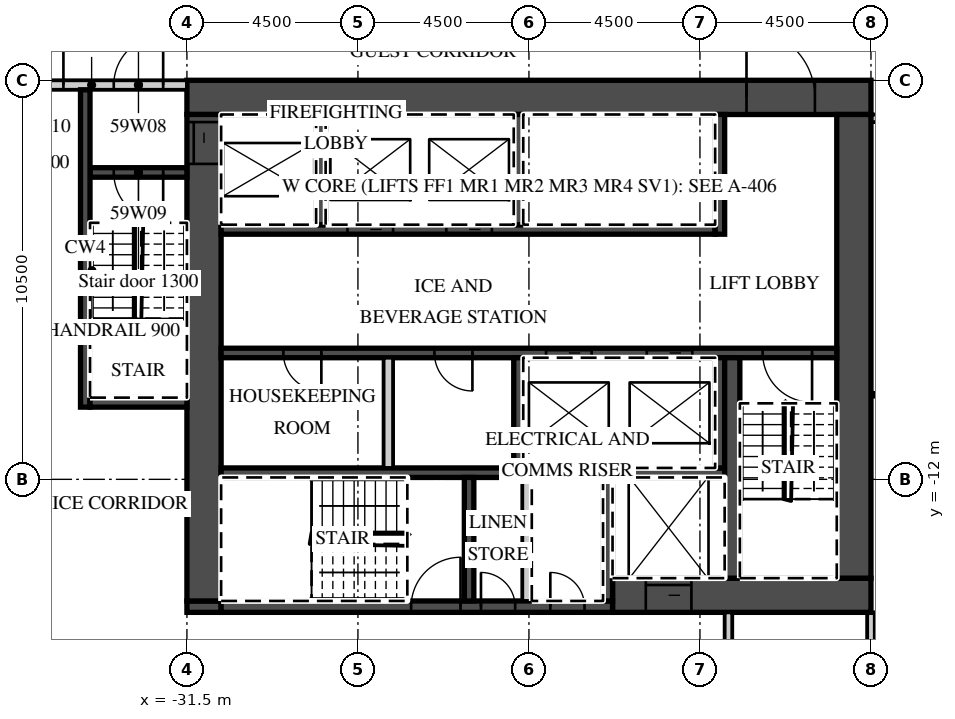
"""IFC4 building model, lengths in metres.
Left out: names, types, materials, properties, quantities, classifications, styles, units other than length and angle.
Written with IfcOpenShell. Run it as: python <this file> out.ifc"""

import sys

from ifc_helpers import new_model, si_unit, direction, frame, frame_2d, origin, place, context, subcontext, project, spatial, rectangle, extrude, element, fill, save


model = new_model("IFC4")
c1 = context("Model", 3, precision=1e-05, world=origin(), true_north=direction((0.0, 1.0)))
c2 = subcontext(c1, "Body", "Model", "MODEL_VIEW")
j1 = project(units=[si_unit("LENGTHUNIT", "METRE"), si_unit("PLANEANGLEUNIT", "RADIAN")], contexts=[c1])
p1 = place(None, origin())
s1 = spatial("IfcSite", under=j1, at=p1, CompositionType="ELEMENT")
p2 = place(p1, origin())
s2 = spatial("IfcBuilding", under=s1, at=p2, CompositionType="ELEMENT")
p3 = place(p2, frame((0.0, 0.0, 240.8)))
s3 = spatial("IfcBuildingStorey", under=s2, at=p3, CompositionType="ELEMENT", Elevation=240.8)
p4 = place(p3, frame((-13.5, -19.641, 0.0), z_axis=(0.0, 0.0, 1.0), x_axis=(0.0, 1.0, 0.0)))
e1 = element("IfcWall", 1, at=p4, inside=s3, PredefinedType="PARTITIONING", context=c2, shape_type="SweptSolid", body=[
    extrude(rectangle(XDim=4.141, YDim=0.2, at=frame_2d((2.071, 0.0))), origin(), (0.0, 0.0, 1.0), 3.02),
])
p5 = place(p3, frame((-13.5, -2.5, 0.0), z_axis=(0.0, 0.0, 1.0), x_axis=(1.0, 0.0, 0.0)))
e2 = element("IfcWall", 2, at=p5, inside=s3, PredefinedType="PARTITIONING", context=c2, shape_type="SweptSolid", body=[
    extrude(rectangle(XDim=27.0, YDim=0.2, at=frame_2d((13.5, 0.0))), origin(), (0.0, 0.0, 1.0), 3.02),
])
p6 = place(p5, frame((0.575, 0.0, 0.0)))
e3 = element("IfcOpeningElement", 3, at=p6, cuts=e2, PredefinedType="OPENING", context=c2, shape_type="SweptSolid", body=[
    extrude(rectangle(XDim=1.0, YDim=2.1, at=frame_2d((0.5, 1.05))), frame((0.0, 0.11, 0.0), z_axis=(0.0, -1.0, 0.0), x_axis=(1.0, 0.0, 0.0)), (0.0, 0.0, 1.0), 0.22),
])
p7 = place(p5, frame((9.863, 0.0, 0.0)))
e4 = element("IfcOpeningElement", 4, at=p7, cuts=e2, PredefinedType="OPENING", context=c2, shape_type="SweptSolid", body=[
    extrude(rectangle(XDim=1.2, YDim=2.1, at=frame_2d((0.6, 1.05))), frame((0.0, 0.11, 0.0), z_axis=(0.0, -1.0, 0.0), x_axis=(1.0, 0.0, 0.0)), (0.0, 0.0, 1.0), 0.22),
])
p8 = place(p5, frame((15.938, 0.0, 0.0)))
e5 = element("IfcOpeningElement", 5, at=p8, cuts=e2, PredefinedType="OPENING", context=c2, shape_type="SweptSolid", body=[
    extrude(rectangle(XDim=1.2, YDim=2.1, at=frame_2d((0.6, 1.05))), frame((0.0, 0.11, 0.0), z_axis=(0.0, -1.0, 0.0), x_axis=(1.0, 0.0, 0.0)), (0.0, 0.0, 1.0), 0.22),
])
p9 = place(p5, frame((23.075, 0.0, 0.0)))
e6 = element("IfcOpeningElement", 6, at=p9, cuts=e2, PredefinedType="OPENING", context=c2, shape_type="SweptSolid", body=[
    extrude(rectangle(XDim=1.0, YDim=2.1, at=frame_2d((0.5, 1.05))), frame((0.0, 0.11, 0.0), z_axis=(0.0, -1.0, 0.0), x_axis=(1.0, 0.0, 0.0)), (0.0, 0.0, 1.0), 0.22),
])
p10 = place(p3, frame((-31.5, -1.95, 0.0), z_axis=(0.0, 0.0, 1.0), x_axis=(1.0, 0.0, 0.0)))
e7 = element("IfcWall", 7, at=p10, inside=s3, PredefinedType="SHEAR", context=c2, shape_type="SweptSolid", body=[
    extrude(rectangle(XDim=18.0, YDim=0.9, at=frame_2d((9.0, 0.0))), origin(), (0.0, 0.0, 1.0), 3.02),
])
p11 = place(p10, frame((14.725, 0.0, 0.0)))
e8 = element("IfcOpeningElement", 8, at=p11, cuts=e7, PredefinedType="OPENING", context=c2, shape_type="SweptSolid", body=[
    extrude(rectangle(XDim=1.8, YDim=2.1, at=frame_2d((0.9, 1.05))), frame((0.0, 0.46, 0.0), z_axis=(0.0, -1.0, 0.0), x_axis=(1.0, 0.0, 0.0)), (0.0, 0.0, 1.0), 0.92),
])
p12 = place(p3, frame((-20.3, -15.05, 0.0), z_axis=(0.0, 0.0, 1.0), x_axis=(1.0, 0.0, 0.0)))
e9 = element("IfcWall", 9, at=p12, inside=s3, PredefinedType="SHEAR", context=c2, shape_type="SweptSolid", body=[
    extrude(rectangle(XDim=6.8, YDim=0.9, at=frame_2d((3.4, 0.0))), origin(), (0.0, 0.0, 1.0), 3.02),
])
p13 = place(p12, frame((0.875, 0.0, 0.0)))
e10 = element("IfcOpeningElement", 10, at=p13, cuts=e9, PredefinedType="OPENING", context=c2, shape_type="SweptSolid", body=[
    extrude(rectangle(XDim=1.2, YDim=2.1, at=frame_2d((0.6, 1.05))), frame((0.0, 0.46, 0.0), z_axis=(0.0, -1.0, 0.0), x_axis=(1.0, 0.0, 0.0)), (0.0, 0.0, 1.0), 0.92),
])
p14 = place(p3, frame((-31.5, -15.35, 0.0), z_axis=(0.0, 0.0, 1.0), x_axis=(1.0, 0.0, 0.0)))
e11 = element("IfcWall", 11, at=p14, inside=s3, PredefinedType="SHEAR", context=c2, shape_type="SweptSolid", body=[
    extrude(rectangle(XDim=0.9, YDim=0.3, at=frame_2d((0.45, 0.0))), origin(), (0.0, 0.0, 1.0), 3.02),
])
p15 = place(p3, frame((-30.6, -15.35, 0.0), z_axis=(0.0, 0.0, 1.0), x_axis=(1.0, 0.0, 0.0)))
e12 = element("IfcWall", 12, at=p15, inside=s3, PredefinedType="SHEAR", context=c2, shape_type="SweptSolid", body=[
    extrude(rectangle(XDim=10.3, YDim=0.3, at=frame_2d((5.15, 0.0))), origin(), (0.0, 0.0, 1.0), 3.02),
])
p16 = place(p15, frame((5.0, 0.0, 0.0)))
e13 = element("IfcOpeningElement", 13, at=p16, cuts=e12, PredefinedType="OPENING", context=c2, shape_type="SweptSolid", body=[
    extrude(rectangle(XDim=1.3, YDim=2.1, at=frame_2d((0.65, 1.05))), frame((0.0, 0.16, 0.0), z_axis=(0.0, -1.0, 0.0), x_axis=(1.0, 0.0, 0.0)), (0.0, 0.0, 1.0), 0.32),
])
p17 = place(p15, frame((6.837, 0.0, 0.0)))
e14 = element("IfcOpeningElement", 14, at=p17, cuts=e12, PredefinedType="OPENING", context=c2, shape_type="SweptSolid", body=[
    extrude(rectangle(XDim=0.9, YDim=2.1, at=frame_2d((0.45, 1.05))), frame((0.0, 0.16, 0.0), z_axis=(0.0, -1.0, 0.0), x_axis=(1.0, 0.0, 0.0)), (0.0, 0.0, 1.0), 0.32),
])
p18 = place(p15, frame((8.663, 0.0, 0.0)))
e15 = element("IfcOpeningElement", 15, at=p18, cuts=e12, PredefinedType="OPENING", context=c2, shape_type="SweptSolid", body=[
    extrude(rectangle(XDim=0.9, YDim=2.1, at=frame_2d((0.45, 1.05))), frame((0.0, 0.16, 0.0), z_axis=(0.0, -1.0, 0.0), x_axis=(1.0, 0.0, 0.0)), (0.0, 0.0, 1.0), 0.32),
])
p19 = place(p3, frame((-31.05, -15.2, 0.0), z_axis=(0.0, 0.0, 1.0), x_axis=(0.0, 1.0, 0.0)))
e16 = element("IfcWall", 16, at=p19, inside=s3, PredefinedType="SHEAR", context=c2, shape_type="SweptSolid", body=[
    extrude(rectangle(XDim=12.8, YDim=0.9, at=frame_2d((6.4, 0.0))), origin(), (0.0, 0.0, 1.0), 3.02),
])
p20 = place(p19, frame((11.5, 0.0, 0.0)))
e17 = element("IfcOpeningElement", 17, at=p20, cuts=e16, PredefinedType="OPENING", context=c2, shape_type="SweptSolid", body=[
    extrude(rectangle(XDim=1.1, YDim=2.1, at=frame_2d((0.55, 1.05))), frame((0.0, 0.46, 0.0), z_axis=(0.0, -1.0, 0.0), x_axis=(1.0, 0.0, 0.0)), (0.0, 0.0, 1.0), 0.92),
])
p21 = place(p3, frame((-13.95, -14.6, 0.0), z_axis=(0.0, 0.0, 1.0), x_axis=(0.0, 1.0, 0.0)))
e18 = element("IfcWall", 18, at=p21, inside=s3, PredefinedType="SHEAR", context=c2, shape_type="SweptSolid", body=[
    extrude(rectangle(XDim=12.2, YDim=0.9, at=frame_2d((6.1, 0.0))), origin(), (0.0, 0.0, 1.0), 3.02),
])
p22 = place(p3, frame((-30.6, -5.425, 0.0), z_axis=(0.0, 0.0, 1.0), x_axis=(1.0, 0.0, 0.0)))
e19 = element("IfcWall", 19, at=p22, inside=s3, PredefinedType="SHEAR", context=c2, shape_type="SweptSolid", body=[
    extrude(rectangle(XDim=13.0, YDim=0.25, at=frame_2d((6.5, 0.0))), origin(), (0.0, 0.0, 1.0), 3.02),
])
p23 = place(p22, frame((3.325, 0.0, 0.0)))
e20 = element("IfcOpeningElement", 20, at=p23, cuts=e19, PredefinedType="OPENING", context=c2, shape_type="SweptSolid", body=[
    extrude(rectangle(XDim=1.2, YDim=2.1, at=frame_2d((0.6, 1.05))), frame((0.0, 0.135, 0.0), z_axis=(0.0, -1.0, 0.0), x_axis=(1.0, 0.0, 0.0)), (0.0, 0.0, 1.0), 0.27),
])
p24 = place(p22, frame((5.925, 0.0, 0.0)))
e21 = element("IfcOpeningElement", 21, at=p24, cuts=e19, PredefinedType="OPENING", context=c2, shape_type="SweptSolid", body=[
    extrude(rectangle(XDim=1.2, YDim=2.1, at=frame_2d((0.6, 1.05))), frame((0.0, 0.135, 0.0), z_axis=(0.0, -1.0, 0.0), x_axis=(1.0, 0.0, 0.0)), (0.0, 0.0, 1.0), 0.27),
])
p25 = place(p3, frame((-17.475, -5.55, 0.0), z_axis=(0.0, 0.0, 1.0), x_axis=(0.0, 1.0, 0.0)))
e22 = element("IfcWall", 22, at=p25, inside=s3, PredefinedType="SHEAR", context=c2, shape_type="SweptSolid", body=[
    extrude(rectangle(XDim=3.15, YDim=0.25, at=frame_2d((1.575, 0.0))), origin(), (0.0, 0.0, 1.0), 3.02),
])
for number, where, z_axis, x_axis in (
    (23, (-27.975, -5.3, 0.0), (0.0, 0.0, 1.0), (0.0, 1.0, 0.0)),
    (24, (-22.775, -5.3, 0.0), (0.0, 0.0, 1.0), (0.0, 1.0, 0.0)),
):
    element("IfcWall", number, at=place(p3, frame(where, z_axis=z_axis, x_axis=x_axis)), inside=s3, PredefinedType="SHEAR", context=c2, shape_type="SweptSolid", body=[
        extrude(rectangle(XDim=2.9, YDim=0.25, at=frame_2d((1.45, 0.0))), origin(), (0.0, 0.0, 1.0), 3.02),
    ])
p26 = place(p3, frame((-30.6, -8.675, 0.0), z_axis=(0.0, 0.0, 1.0), x_axis=(1.0, 0.0, 0.0)))
e25 = element("IfcWall", 25, at=p26, inside=s3, PredefinedType="SHEAR", context=c2, shape_type="SweptSolid", body=[
    extrude(rectangle(XDim=16.2, YDim=0.25, at=frame_2d((8.1, 0.0))), origin(), (0.0, 0.0, 1.0), 3.02),
])
p27 = place(p26, frame((8.55, 0.0, 0.0)))
e26 = element("IfcOpeningElement", 26, at=p27, cuts=e25, PredefinedType="OPENING", context=c2, shape_type="SweptSolid", body=[
    extrude(rectangle(XDim=1.2, YDim=2.1, at=frame_2d((0.6, 1.05))), frame((0.0, 0.135, 0.0), z_axis=(0.0, -1.0, 0.0), x_axis=(1.0, 0.0, 0.0)), (0.0, 0.0, 1.0), 0.27),
])
p28 = place(p26, frame((11.2, 0.0, 0.0)))
e27 = element("IfcOpeningElement", 27, at=p28, cuts=e25, PredefinedType="OPENING", context=c2, shape_type="SweptSolid", body=[
    extrude(rectangle(XDim=1.2, YDim=2.1, at=frame_2d((0.6, 1.05))), frame((0.0, 0.135, 0.0), z_axis=(0.0, -1.0, 0.0), x_axis=(1.0, 0.0, 0.0)), (0.0, 0.0, 1.0), 0.27),
])
p29 = place(p26, frame((14.25, 0.0, 0.0)))
e28 = element("IfcOpeningElement", 28, at=p29, cuts=e25, PredefinedType="OPENING", context=c2, shape_type="SweptSolid", body=[
    extrude(rectangle(XDim=1.3, YDim=2.1, at=frame_2d((0.65, 1.05))), frame((0.0, 0.135, 0.0), z_axis=(0.0, -1.0, 0.0), x_axis=(1.0, 0.0, 0.0)), (0.0, 0.0, 1.0), 0.27),
])
p30 = place(p26, frame((1.637, 0.0, 0.0)))
e29 = element("IfcOpeningElement", 29, at=p30, cuts=e25, PredefinedType="OPENING", context=c2, shape_type="SweptSolid", body=[
    extrude(rectangle(XDim=1.0, YDim=2.1, at=frame_2d((0.5, 1.05))), frame((0.0, 0.135, 0.0), z_axis=(0.0, -1.0, 0.0), x_axis=(1.0, 0.0, 0.0)), (0.0, 0.0, 1.0), 0.27),
])
p31 = place(p26, frame((5.613, 0.0, 0.0)))
e30 = element("IfcOpeningElement", 30, at=p31, cuts=e25, PredefinedType="OPENING", context=c2, shape_type="SweptSolid", body=[
    extrude(rectangle(XDim=1.0, YDim=2.1, at=frame_2d((0.5, 1.05))), frame((0.0, 0.135, 0.0), z_axis=(0.0, -1.0, 0.0), x_axis=(1.0, 0.0, 0.0)), (0.0, 0.0, 1.0), 0.27),
])
p32 = place(p3, frame((-30.6, -11.825, 0.0), z_axis=(0.0, 0.0, 1.0), x_axis=(1.0, 0.0, 0.0)))
e31 = element("IfcWall", 31, at=p32, inside=s3, PredefinedType="SHEAR", context=c2, shape_type="SweptSolid", body=[
    extrude(rectangle(XDim=13.25, YDim=0.25, at=frame_2d((6.625, 0.0))), origin(), (0.0, 0.0, 1.0), 3.02),
])
for number, where, z_axis, x_axis in (
    (32, (-17.475, -11.7, 0.0), (0.0, 0.0, 1.0), (0.0, 1.0, 0.0)),
    (33, (-22.775, -11.7, 0.0), (0.0, 0.0, 1.0), (0.0, 1.0, 0.0)),
):
    element("IfcWall", number, at=place(p3, frame(where, z_axis=z_axis, x_axis=x_axis)), inside=s3, PredefinedType="SHEAR", context=c2, shape_type="SweptSolid", body=[
        extrude(rectangle(XDim=2.9, YDim=0.25, at=frame_2d((1.45, 0.0))), origin(), (0.0, 0.0, 1.0), 3.02),
    ])
p33 = place(p3, frame((-26.2, -11.7, 0.0), z_axis=(0.0, 0.0, 1.0), x_axis=(0.0, 1.0, 0.0)))
e34 = element("IfcWall", 34, at=p33, inside=s3, PredefinedType="PARTITIONING", context=c2, shape_type="SweptSolid", body=[
    extrude(rectangle(XDim=2.9, YDim=0.25, at=frame_2d((1.45, 0.0))), origin(), (0.0, 0.0, 1.0), 3.02),
])
p34 = place(p3, frame((-17.15, -14.6, 0.0), z_axis=(0.0, 0.0, 1.0), x_axis=(0.0, 1.0, 0.0)))
e35 = element("IfcWall", 35, at=p34, inside=s3, PredefinedType="SHEAR", context=c2, shape_type="SweptSolid", body=[
    extrude(rectangle(XDim=5.8, YDim=0.4, at=frame_2d((2.9, 0.0))), origin(), (0.0, 0.0, 1.0), 3.02),
])
for number, where, z_axis, x_axis in (
    (36, (-20.425, -15.2, 0.0), (0.0, 0.0, 1.0), (0.0, 1.0, 0.0)),
    (37, (-24.075, -15.2, 0.0), (0.0, 0.0, 1.0), (0.0, 1.0, 0.0)),
):
    element("IfcWall", number, at=place(p3, frame(where, z_axis=z_axis, x_axis=x_axis)), inside=s3, PredefinedType="SHEAR", context=c2, shape_type="SweptSolid", body=[
        extrude(rectangle(XDim=3.25, YDim=0.25, at=frame_2d((1.625, 0.0))), origin(), (0.0, 0.0, 1.0), 3.02),
    ])
p35 = place(p3, frame((-22.55, -15.2, 0.0), z_axis=(0.0, 0.0, 1.0), x_axis=(0.0, 1.0, 0.0)))
e38 = element("IfcWall", 38, at=p35, inside=s3, PredefinedType="PARTITIONING", context=c2, shape_type="SweptSolid", body=[
    extrude(rectangle(XDim=3.25, YDim=0.25, at=frame_2d((1.625, 0.0))), origin(), (0.0, 0.0, 1.0), 3.02),
])
p36 = place(p3, frame((-36.515, -1.625, 0.0), z_axis=(0.0, 0.0, 1.0), x_axis=(1.0, 0.0, 0.0)))
e39 = element("IfcWall", 39, at=p36, inside=s3, PredefinedType="PARTITIONING", context=c2, shape_type="SweptSolid", body=[
    extrude(rectangle(XDim=5.015, YDim=0.25, at=frame_2d((2.508, 0.0))), origin(), (0.0, 0.0, 1.0), 3.02),
])
p37 = place(p36, frame((3.09, 0.0, 0.0)))
e40 = element("IfcOpeningElement", 40, at=p37, cuts=e39, PredefinedType="OPENING", context=c2, shape_type="SweptSolid", body=[
    extrude(rectangle(XDim=1.3, YDim=2.1, at=frame_2d((0.65, 1.05))), frame((0.0, 0.135, 0.0), z_axis=(0.0, -1.0, 0.0), x_axis=(1.0, 0.0, 0.0)), (0.0, 0.0, 1.0), 0.27),
])
p38 = place(p36, frame((0.665, 0.0, 0.0)))
e41 = element("IfcOpeningElement", 41, at=p38, cuts=e39, PredefinedType="OPENING", context=c2, shape_type="SweptSolid", body=[
    extrude(rectangle(XDim=1.1, YDim=2.1, at=frame_2d((0.55, 1.05))), frame((0.0, 0.135, 0.0), z_axis=(0.0, -1.0, 0.0), x_axis=(1.0, 0.0, 0.0)), (0.0, 0.0, 1.0), 0.27),
])
p39 = place(p3, frame((-34.05, -3.925, 0.0), z_axis=(0.0, 0.0, 1.0), x_axis=(1.0, 0.0, 0.0)))
e42 = element("IfcWall", 42, at=p39, inside=s3, PredefinedType="SHEAR", context=c2, shape_type="SweptSolid", body=[
    extrude(rectangle(XDim=2.55, YDim=0.25, at=frame_2d((1.275, 0.0))), origin(), (0.0, 0.0, 1.0), 3.02),
])
p40 = place(p39, frame((0.625, 0.0, 0.0)))
e43 = element("IfcOpeningElement", 43, at=p40, cuts=e42, PredefinedType="OPENING", context=c2, shape_type="SweptSolid", body=[
    extrude(rectangle(XDim=1.3, YDim=2.1, at=frame_2d((0.65, 1.05))), frame((0.0, 0.135, 0.0), z_axis=(0.0, -1.0, 0.0), x_axis=(1.0, 0.0, 0.0)), (0.0, 0.0, 1.0), 0.27),
])
p41 = place(p3, frame((-34.175, -10.1, 0.0), z_axis=(0.0, 0.0, 1.0), x_axis=(0.0, 1.0, 0.0)))
e44 = element("IfcWall", 44, at=p41, inside=s3, PredefinedType="SHEAR", context=c2, shape_type="SweptSolid", body=[
    extrude(rectangle(XDim=8.35, YDim=0.25, at=frame_2d((4.175, 0.0))), origin(), (0.0, 0.0, 1.0), 3.02),
])
p42 = place(p3, frame((-34.05, -9.975, 0.0), z_axis=(0.0, 0.0, 1.0), x_axis=(1.0, 0.0, 0.0)))
e45 = element("IfcWall", 45, at=p42, inside=s3, PredefinedType="SHEAR", context=c2, shape_type="SweptSolid", body=[
    extrude(rectangle(XDim=2.55, YDim=0.25, at=frame_2d((1.275, 0.0))), origin(), (0.0, 0.0, 1.0), 3.02),
])
p43 = place(p3, frame((-17.25, -17.7, 0.0), z_axis=(0.0, 0.0, 1.0), x_axis=(0.0, 1.0, 0.0)))
e46 = element("IfcWall", 46, at=p43, inside=s3, PredefinedType="PARTITIONING", context=c2, shape_type="SweptSolid", body=[
    extrude(rectangle(XDim=2.2, YDim=0.2, at=frame_2d((1.1, 0.0))), origin(), (0.0, 0.0, 1.0), 3.02),
])
p44 = place(p27, origin())
e47 = element("IfcDoor", 47, at=p44, inside=s3, OperationType="SLIDING_TO_LEFT", PredefinedType="DOOR", context=c2, shape_type="SweptSolid", body=[
    extrude(rectangle(XDim=1.2, YDim=2.1, at=frame_2d((0.6, 1.05))), frame((0.0, 0.025, 0.0), z_axis=(0.0, -1.0, 0.0), x_axis=(1.0, 0.0, 0.0)), (0.0, 0.0, 1.0), 0.05),
])
fill(e26, e47)
p45 = place(p28, origin())
e48 = element("IfcDoor", 48, at=p45, inside=s3, OperationType="SLIDING_TO_RIGHT", PredefinedType="DOOR", context=c2, shape_type="SweptSolid", body=[
    extrude(rectangle(XDim=1.2, YDim=2.1, at=frame_2d((0.6, 1.05))), frame((0.0, 0.025, 0.0), z_axis=(0.0, -1.0, 0.0), x_axis=(1.0, 0.0, 0.0)), (0.0, 0.0, 1.0), 0.05),
])
fill(e27, e48)
p46 = place(p23, origin())
e49 = element("IfcDoor", 49, at=p46, inside=s3, OperationType="SLIDING_TO_RIGHT", PredefinedType="DOOR", context=c2, shape_type="SweptSolid", body=[
    extrude(rectangle(XDim=1.2, YDim=2.1, at=frame_2d((0.6, 1.05))), frame((0.0, 0.025, 0.0), z_axis=(0.0, -1.0, 0.0), x_axis=(1.0, 0.0, 0.0)), (0.0, 0.0, 1.0), 0.05),
])
fill(e20, e49)
p47 = place(p24, origin())
e50 = element("IfcDoor", 50, at=p47, inside=s3, OperationType="SLIDING_TO_RIGHT", PredefinedType="DOOR", context=c2, shape_type="SweptSolid", body=[
    extrude(rectangle(XDim=1.2, YDim=2.1, at=frame_2d((0.6, 1.05))), frame((0.0, 0.025, 0.0), z_axis=(0.0, -1.0, 0.0), x_axis=(1.0, 0.0, 0.0)), (0.0, 0.0, 1.0), 0.05),
])
fill(e21, e50)
p48 = place(p13, origin())
e51 = element("IfcDoor", 51, at=p48, inside=s3, OperationType="SLIDING_TO_LEFT", PredefinedType="DOOR", context=c2, shape_type="SweptSolid", body=[
    extrude(rectangle(XDim=1.2, YDim=2.1, at=frame_2d((0.6, 1.05))), frame((0.0, 0.025, 0.0), z_axis=(0.0, -1.0, 0.0), x_axis=(1.0, 0.0, 0.0)), (0.0, 0.0, 1.0), 0.05),
])
fill(e10, e51)
p49 = place(p20, origin())
e52 = element("IfcDoor", 52, at=p49, inside=s3, OperationType="SLIDING_TO_RIGHT", PredefinedType="DOOR", context=c2, shape_type="SweptSolid", body=[
    extrude(rectangle(XDim=1.1, YDim=2.1, at=frame_2d((0.55, 1.05))), frame((0.0, 0.025, 0.0), z_axis=(0.0, -1.0, 0.0), x_axis=(1.0, 0.0, 0.0)), (0.0, 0.0, 1.0), 0.05),
])
fill(e17, e52)
p50 = place(p11, origin())
e53 = element("IfcDoor", 53, at=p50, inside=s3, OperationType="DOUBLE_DOOR_DOUBLE_SWING", PredefinedType="DOOR", context=c2, shape_type="SweptSolid", body=[
    extrude(rectangle(XDim=1.8, YDim=2.1, at=frame_2d((0.9, 1.05))), frame((0.0, 0.025, 0.0), z_axis=(0.0, -1.0, 0.0), x_axis=(1.0, 0.0, 0.0)), (0.0, 0.0, 1.0), 0.05),
])
fill(e8, e53)
p51 = place(p37, origin())
e54 = element("IfcDoor", 54, at=p51, inside=s3, OperationType="SINGLE_SWING_RIGHT", PredefinedType="DOOR", context=c2, shape_type="SweptSolid", body=[
    extrude(rectangle(XDim=1.3, YDim=2.1, at=frame_2d((0.65, 1.05))), frame((0.0, 0.025, 0.0), z_axis=(0.0, -1.0, 0.0), x_axis=(1.0, 0.0, 0.0)), (0.0, 0.0, 1.0), 0.05),
])
fill(e40, e54)
p52 = place(p40, origin())
e55 = element("IfcDoor", 55, at=p52, inside=s3, OperationType="SINGLE_SWING_RIGHT", PredefinedType="DOOR", context=c2, shape_type="SweptSolid", body=[
    extrude(rectangle(XDim=1.3, YDim=2.1, at=frame_2d((0.65, 1.05))), frame((0.0, 0.025, 0.0), z_axis=(0.0, -1.0, 0.0), x_axis=(1.0, 0.0, 0.0)), (0.0, 0.0, 1.0), 0.05),
])
fill(e43, e55)
p53 = place(p38, origin())
e56 = element("IfcDoor", 56, at=p53, inside=s3, OperationType="SINGLE_SWING_RIGHT", PredefinedType="DOOR", context=c2, shape_type="SweptSolid", body=[
    extrude(rectangle(XDim=1.1, YDim=2.1, at=frame_2d((0.55, 1.05))), frame((0.0, 0.025, 0.0), z_axis=(0.0, -1.0, 0.0), x_axis=(1.0, 0.0, 0.0)), (0.0, 0.0, 1.0), 0.05),
])
fill(e41, e56)
p54 = place(p29, origin())
e57 = element("IfcDoor", 57, at=p54, inside=s3, OperationType="SINGLE_SWING_RIGHT", PredefinedType="DOOR", context=c2, shape_type="SweptSolid", body=[
    extrude(rectangle(XDim=1.3, YDim=2.1, at=frame_2d((0.65, 1.05))), frame((0.0, 0.025, 0.0), z_axis=(0.0, -1.0, 0.0), x_axis=(1.0, 0.0, 0.0)), (0.0, 0.0, 1.0), 0.05),
])
fill(e28, e57)
p55 = place(p16, origin())
e58 = element("IfcDoor", 58, at=p55, inside=s3, OperationType="SINGLE_SWING_RIGHT", PredefinedType="DOOR", context=c2, shape_type="SweptSolid", body=[
    extrude(rectangle(XDim=1.3, YDim=2.1, at=frame_2d((0.65, 1.05))), frame((0.0, 0.025, 0.0), z_axis=(0.0, -1.0, 0.0), x_axis=(1.0, 0.0, 0.0)), (0.0, 0.0, 1.0), 0.05),
])
fill(e13, e58)
p56 = place(p17, origin())
e59 = element("IfcDoor", 59, at=p56, inside=s3, OperationType="SINGLE_SWING_LEFT", PredefinedType="DOOR", context=c2, shape_type="SweptSolid", body=[
    extrude(rectangle(XDim=0.9, YDim=2.1, at=frame_2d((0.45, 1.05))), frame((0.0, 0.025, 0.0), z_axis=(0.0, -1.0, 0.0), x_axis=(1.0, 0.0, 0.0)), (0.0, 0.0, 1.0), 0.05),
])
fill(e14, e59)
p57 = place(p18, origin())
e60 = element("IfcDoor", 60, at=p57, inside=s3, OperationType="SINGLE_SWING_LEFT", PredefinedType="DOOR", context=c2, shape_type="SweptSolid", body=[
    extrude(rectangle(XDim=0.9, YDim=2.1, at=frame_2d((0.45, 1.05))), frame((0.0, 0.025, 0.0), z_axis=(0.0, -1.0, 0.0), x_axis=(1.0, 0.0, 0.0)), (0.0, 0.0, 1.0), 0.05),
])
fill(e15, e60)
p58 = place(p30, origin())
e61 = element("IfcDoor", 61, at=p58, inside=s3, OperationType="SINGLE_SWING_RIGHT", PredefinedType="DOOR", context=c2, shape_type="SweptSolid", body=[
    extrude(rectangle(XDim=1.0, YDim=2.1, at=frame_2d((0.5, 1.05))), frame((0.0, 0.025, 0.0), z_axis=(0.0, -1.0, 0.0), x_axis=(1.0, 0.0, 0.0)), (0.0, 0.0, 1.0), 0.05),
])
fill(e29, e61)
p59 = place(p31, origin())
e62 = element("IfcDoor", 62, at=p59, inside=s3, OperationType="SINGLE_SWING_RIGHT", PredefinedType="DOOR", context=c2, shape_type="SweptSolid", body=[
    extrude(rectangle(XDim=1.0, YDim=2.1, at=frame_2d((0.5, 1.05))), frame((0.0, 0.025, 0.0), z_axis=(0.0, -1.0, 0.0), x_axis=(1.0, 0.0, 0.0)), (0.0, 0.0, 1.0), 0.05),
])
fill(e30, e62)
save(model, sys.argv[1])
